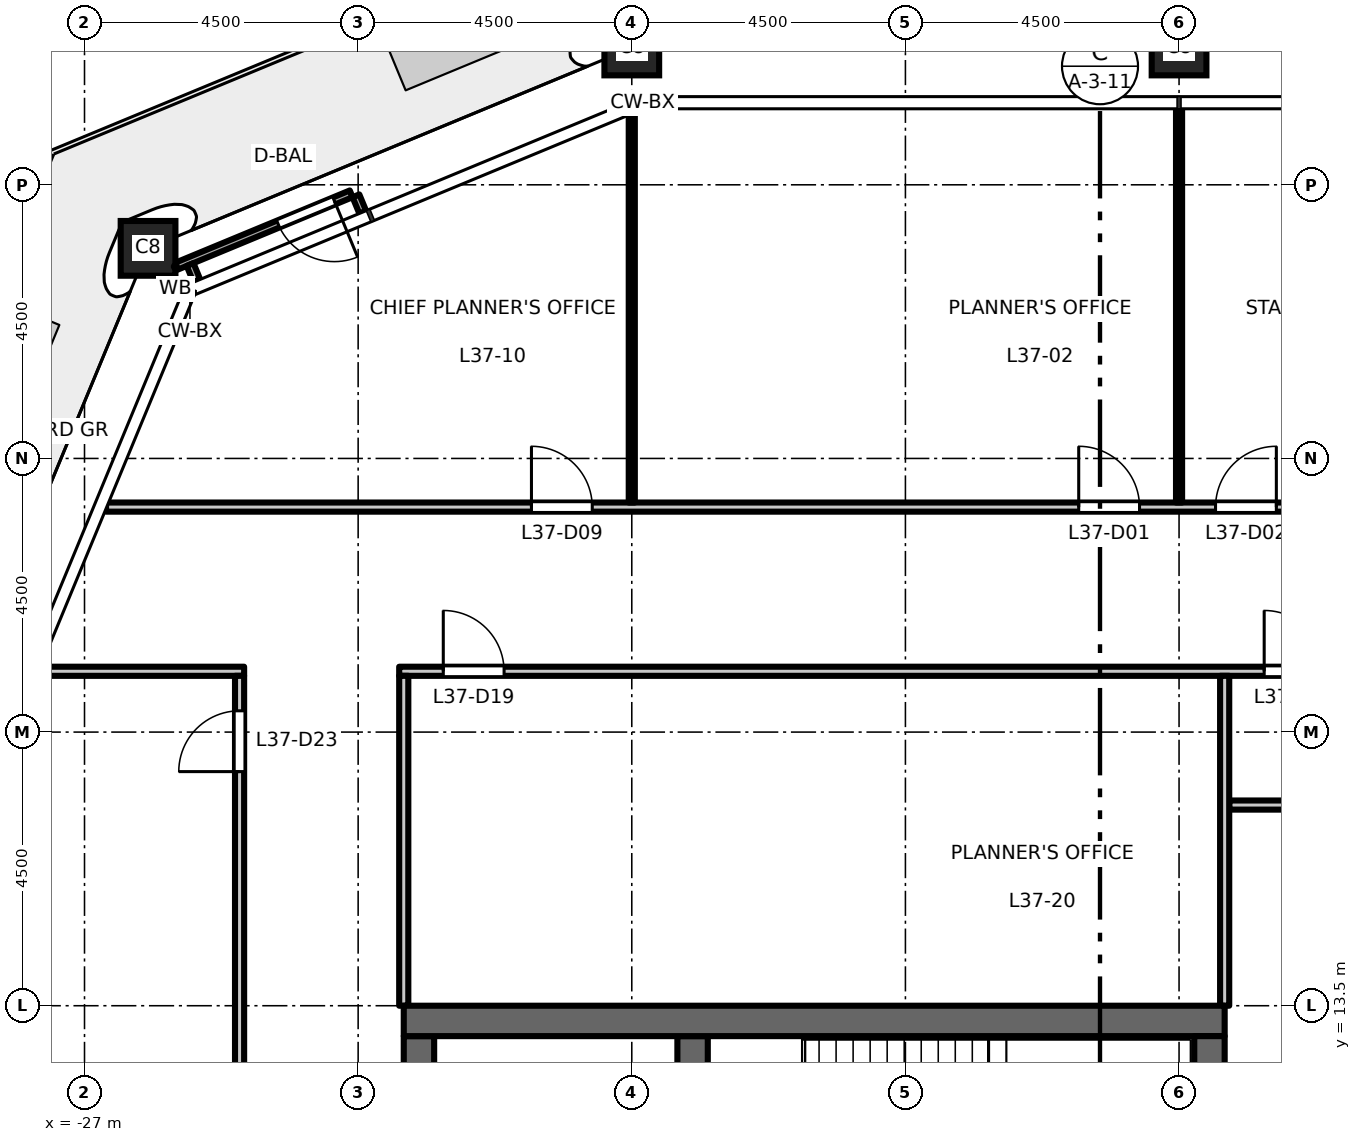
"""IFC4 building model, lengths in metres.
Left out: names, types, materials, properties, quantities, classifications, styles, units other than length and angle.
Written with IfcOpenShell. Run it as: python <this file> out.ifc"""

import sys

from ifc_helpers import new_model, si_unit, direction, frame, frame_2d, origin, origin_2d, place, context, subcontext, project, spatial, rectangle, hollow_rectangle, extrude, element, fill, save


model = new_model("IFC4")
c1 = context("Model", 3, precision=1e-05, world=origin(), true_north=direction((0.0, 1.0)))
c2 = subcontext(c1, "Body", "Model", "MODEL_VIEW")
j1 = project(units=[si_unit("LENGTHUNIT", "METRE"), si_unit("PLANEANGLEUNIT", "RADIAN")], contexts=[c1])
p1 = place(None, origin())
s1 = spatial("IfcSite", under=j1, at=p1, CompositionType="ELEMENT")
p2 = place(p1, origin())
s2 = spatial("IfcBuilding", under=s1, at=p2, CompositionType="ELEMENT")
p3 = place(p2, frame((0.0, 0.0, 172.2)))
s3 = spatial("IfcBuildingStorey", under=s2, at=p3, CompositionType="ELEMENT", Elevation=172.2)
for number, where, z_axis, x_axis in (
    (1, (-9.0, 29.25, 0.0), (0.0, 0.0, 1.0), (1.0, 0.0, 0.0)),
    (2, (-18.0, 29.25, 0.0), (0.0, 0.0, 1.0), (1.0, 0.0, 0.0)),
    (3, (-25.955, 25.955, 0.0), (0.0, 0.0, 1.0), (1.0, 0.0, 0.0)),
):
    element("IfcColumn", number, at=place(p3, frame(where, z_axis=z_axis, x_axis=x_axis)), inside=s3, PredefinedType="COLUMN", context=c2, shape_type="SweptSolid", body=[
        extrude(hollow_rectangle(XDim=0.9, YDim=0.9, WallThickness=0.05, at=origin_2d()), origin(), (0.0, 0.0, 1.0), 4.5),
    ])
p4 = place(p3, frame((-21.5, -13.0, 0.0), z_axis=(0.0, 0.0, 1.0), x_axis=(0.0, 1.0, 0.0)))
e4 = element("IfcWall", 4, at=p4, inside=s3, PredefinedType="SHEAR", context=c2, shape_type="SweptSolid", body=[
    extrude(rectangle(XDim=26.0, YDim=0.5, at=frame_2d((13.0, 0.0))), origin(), (0.0, 0.0, 1.0), 4.35),
])
p5 = place(p4, frame((16.825, 0.0, 0.0)))
e5 = element("IfcOpeningElement", 5, at=p5, cuts=e4, PredefinedType="OPENING", context=c2, shape_type="SweptSolid", body=[
    extrude(rectangle(XDim=1.8, YDim=2.1, at=frame_2d((0.9, 1.05))), frame((0.0, 0.26, 0.0), z_axis=(0.0, -1.0, 0.0), x_axis=(1.0, 0.0, 0.0)), (0.0, 0.0, 1.0), 0.52),
])
p6 = place(p4, frame((7.375, 0.0, 0.0)))
e6 = element("IfcOpeningElement", 6, at=p6, cuts=e4, PredefinedType="OPENING", context=c2, shape_type="SweptSolid", body=[
    extrude(rectangle(XDim=1.8, YDim=2.1, at=frame_2d((0.9, 1.05))), frame((0.0, 0.26, 0.0), z_axis=(0.0, -1.0, 0.0), x_axis=(1.0, 0.0, 0.0)), (0.0, 0.0, 1.0), 0.52),
])
p7 = place(p4, frame((2.65, 0.0, 0.0)))
e7 = element("IfcOpeningElement", 7, at=p7, cuts=e4, PredefinedType="OPENING", context=c2, shape_type="SweptSolid", body=[
    extrude(rectangle(XDim=0.9, YDim=2.1, at=frame_2d((0.45, 1.05))), frame((0.0, 0.26, 0.0), z_axis=(0.0, -1.0, 0.0), x_axis=(1.0, 0.0, 0.0)), (0.0, 0.0, 1.0), 0.52),
])
p8 = place(p3, frame((-17.0, 6.425, 0.0), z_axis=(0.0, 0.0, 1.0), x_axis=(0.0, 1.0, 0.0)))
e8 = element("IfcWall", 8, at=p8, inside=s3, PredefinedType="SHEAR", context=c2, shape_type="SweptSolid", body=[
    extrude(rectangle(XDim=6.575, YDim=0.5, at=frame_2d((3.288, 0.0))), origin(), (0.0, 0.0, 1.0), 4.35),
])
p9 = place(p3, frame((-8.25, 13.25, 0.0), z_axis=(0.0, 0.0, 1.0), x_axis=(-1.0, 0.0, 0.0)))
e9 = element("IfcWall", 9, at=p9, inside=s3, PredefinedType="SHEAR", context=c2, shape_type="SweptSolid", body=[
    extrude(rectangle(XDim=13.5, YDim=0.5, at=frame_2d((6.75, 0.0))), origin(), (0.0, 0.0, 1.0), 4.35),
])
p10 = place(p3, frame((-8.5, -13.0, 0.0), z_axis=(0.0, 0.0, 1.0), x_axis=(0.0, 1.0, 0.0)))
e10 = element("IfcWall", 10, at=p10, inside=s3, PredefinedType="SHEAR", context=c2, shape_type="SweptSolid", body=[
    extrude(rectangle(XDim=26.0, YDim=0.5, at=frame_2d((13.0, 0.0))), origin(), (0.0, 0.0, 1.0), 4.35),
])
for number, where, z_axis, x_axis in (
    (11, (-22.425, 26.551, 0.0), (0.0, 0.0, 1.0), (-0.382, 0.924, 0.0)),
    (12, (-25.153, 25.421, 0.0), (0.0, 0.0, 1.0), (-0.383, 0.924, 0.0)),
):
    element("IfcWall", number, at=place(p3, frame(where, z_axis=z_axis, x_axis=x_axis)), inside=s3, PredefinedType="STANDARD", context=c2, shape_type="SweptSolid", body=[
        extrude(rectangle(XDim=0.29, YDim=0.12, at=frame_2d((0.145, 0.0))), origin(), (0.0, 0.0, 1.0), 4.35),
    ])
p11 = place(p3, frame((-22.615, 26.852, 0.0), z_axis=(0.0, 0.0, 1.0), x_axis=(-0.923876066186, -0.382691800707, 0.0)))
e13 = element("IfcWall", 13, at=p11, inside=s3, PredefinedType="STANDARD", context=c2, shape_type="SweptSolid", body=[
    extrude(rectangle(XDim=3.128, YDim=0.12, at=frame_2d((1.564, 0.0))), origin(), (0.0, 0.0, 1.0), 4.35),
])
p12 = place(p11, frame((0.3, 0.0, 0.0)))
e14 = element("IfcOpeningElement", 14, at=p12, cuts=e13, PredefinedType="OPENING", context=c2, shape_type="SweptSolid", body=[
    extrude(rectangle(XDim=1.0, YDim=2.4, at=frame_2d((0.5, 1.2))), frame((0.0, 0.07, 0.0), z_axis=(0.0, -1.0, 0.0), x_axis=(1.0, 0.0, 0.0)), (0.0, 0.0, 1.0), 0.14),
])
p13 = place(p3, frame((-8.175, 16.8, 0.0), z_axis=(0.0, 0.0, 1.0), x_axis=(1.0, 0.0, 0.0)))
e15 = element("IfcWall", 15, at=p13, inside=s3, PredefinedType="PARTITIONING", context=c2, shape_type="SweptSolid", body=[
    extrude(rectangle(XDim=15.095, YDim=0.15, at=frame_2d((7.547, 0.0))), origin(), (0.0, 0.0, 1.0), 4.35),
])
p14 = place(p13, frame((4.575, 0.0, 0.0)))
e16 = element("IfcOpeningElement", 16, at=p14, cuts=e15, PredefinedType="OPENING", context=c2, shape_type="SweptSolid", body=[
    extrude(rectangle(XDim=1.0, YDim=2.1, at=frame_2d((0.5, 1.05))), frame((0.0, 0.085, 0.0), z_axis=(0.0, -1.0, 0.0), x_axis=(1.0, 0.0, 0.0)), (0.0, 0.0, 1.0), 0.17),
])
p15 = place(p13, frame((6.825, 0.0, 0.0)))
e17 = element("IfcOpeningElement", 17, at=p15, cuts=e15, PredefinedType="OPENING", context=c2, shape_type="SweptSolid", body=[
    extrude(rectangle(XDim=1.0, YDim=2.1, at=frame_2d((0.5, 1.05))), frame((0.0, 0.085, 0.0), z_axis=(0.0, -1.0, 0.0), x_axis=(1.0, 0.0, 0.0)), (0.0, 0.0, 1.0), 0.17),
])
p16 = place(p13, frame((13.575, 0.0, 0.0)))
e18 = element("IfcOpeningElement", 18, at=p16, cuts=e15, PredefinedType="OPENING", context=c2, shape_type="SweptSolid", body=[
    extrude(rectangle(XDim=1.0, YDim=2.1, at=frame_2d((0.5, 1.05))), frame((0.0, 0.085, 0.0), z_axis=(0.0, -1.0, 0.0), x_axis=(1.0, 0.0, 0.0)), (0.0, 0.0, 1.0), 0.17),
])
p17 = place(p3, frame((-27.764, 19.0, 0.0), z_axis=(0.0, 0.0, 1.0), x_axis=(1.0, 0.0, 0.0)))
e19 = element("IfcWall", 19, at=p17, inside=s3, PredefinedType="PARTITIONING", context=c2, shape_type="SweptSolid", body=[
    extrude(rectangle(XDim=3.389, YDim=0.15, at=frame_2d((1.694, 0.0))), origin(), (0.0, 0.0, 1.0), 4.35),
])
p18 = place(p3, frame((-21.825, 19.0, 0.0), z_axis=(0.0, 0.0, 1.0), x_axis=(1.0, 0.0, 0.0)))
e20 = element("IfcWall", 20, at=p18, inside=s3, PredefinedType="PARTITIONING", context=c2, shape_type="SweptSolid", body=[
    extrude(rectangle(XDim=43.65, YDim=0.15, at=frame_2d((21.825, 0.0))), origin(), (0.0, 0.0, 1.0), 4.35),
])
p19 = place(p18, frame((14.225, 0.0, 0.0)))
e21 = element("IfcOpeningElement", 21, at=p19, cuts=e20, PredefinedType="OPENING", context=c2, shape_type="SweptSolid", body=[
    extrude(rectangle(XDim=1.0, YDim=2.1, at=frame_2d((0.5, 1.05))), frame((0.0, 0.085, 0.0), z_axis=(0.0, -1.0, 0.0), x_axis=(1.0, 0.0, 0.0)), (0.0, 0.0, 1.0), 0.17),
])
p20 = place(p18, frame((0.725, 0.0, 0.0)))
e22 = element("IfcOpeningElement", 22, at=p20, cuts=e20, PredefinedType="OPENING", context=c2, shape_type="SweptSolid", body=[
    extrude(rectangle(XDim=1.0, YDim=2.1, at=frame_2d((0.5, 1.05))), frame((0.0, 0.085, 0.0), z_axis=(0.0, -1.0, 0.0), x_axis=(1.0, 0.0, 0.0)), (0.0, 0.0, 1.0), 0.17),
])
p21 = place(p18, frame((41.975, 0.0, 0.0)))
e23 = element("IfcOpeningElement", 23, at=p21, cuts=e20, PredefinedType="OPENING", context=c2, shape_type="SweptSolid", body=[
    extrude(rectangle(XDim=1.0, YDim=2.1, at=frame_2d((0.5, 1.05))), frame((0.0, 0.085, 0.0), z_axis=(0.0, -1.0, 0.0), x_axis=(1.0, 0.0, 0.0)), (0.0, 0.0, 1.0), 0.17),
])
p22 = place(p3, frame((-26.646, 21.7, 0.0), z_axis=(0.0, 0.0, 1.0), x_axis=(1.0, 0.0, 0.0)))
e24 = element("IfcWall", 24, at=p22, inside=s3, PredefinedType="PARTITIONING", context=c2, shape_type="SweptSolid", body=[
    extrude(rectangle(XDim=53.292, YDim=0.15, at=frame_2d((26.646, 0.0))), origin(), (0.0, 0.0, 1.0), 4.35),
])
p23 = place(p22, frame((15.996, 0.0, 0.0)))
e25 = element("IfcOpeningElement", 25, at=p23, cuts=e24, PredefinedType="OPENING", context=c2, shape_type="SweptSolid", body=[
    extrude(rectangle(XDim=1.0, YDim=2.1, at=frame_2d((0.5, 1.05))), frame((0.0, 0.085, 0.0), z_axis=(0.0, -1.0, 0.0), x_axis=(1.0, 0.0, 0.0)), (0.0, 0.0, 1.0), 0.17),
])
p24 = place(p22, frame((18.246, 0.0, 0.0)))
e26 = element("IfcOpeningElement", 26, at=p24, cuts=e24, PredefinedType="OPENING", context=c2, shape_type="SweptSolid", body=[
    extrude(rectangle(XDim=1.0, YDim=2.1, at=frame_2d((0.5, 1.05))), frame((0.0, 0.085, 0.0), z_axis=(0.0, -1.0, 0.0), x_axis=(1.0, 0.0, 0.0)), (0.0, 0.0, 1.0), 0.17),
])
p25 = place(p22, frame((33.996, 0.0, 0.0)))
e27 = element("IfcOpeningElement", 27, at=p25, cuts=e24, PredefinedType="OPENING", context=c2, shape_type="SweptSolid", body=[
    extrude(rectangle(XDim=1.0, YDim=2.1, at=frame_2d((0.5, 1.05))), frame((0.0, 0.085, 0.0), z_axis=(0.0, -1.0, 0.0), x_axis=(1.0, 0.0, 0.0)), (0.0, 0.0, 1.0), 0.17),
])
p26 = place(p22, frame((36.246, 0.0, 0.0)))
e28 = element("IfcOpeningElement", 28, at=p26, cuts=e24, PredefinedType="OPENING", context=c2, shape_type="SweptSolid", body=[
    extrude(rectangle(XDim=1.0, YDim=2.1, at=frame_2d((0.5, 1.05))), frame((0.0, 0.085, 0.0), z_axis=(0.0, -1.0, 0.0), x_axis=(1.0, 0.0, 0.0)), (0.0, 0.0, 1.0), 0.17),
])
p27 = place(p22, frame((6.996, 0.0, 0.0)))
e29 = element("IfcOpeningElement", 29, at=p27, cuts=e24, PredefinedType="OPENING", context=c2, shape_type="SweptSolid", body=[
    extrude(rectangle(XDim=1.0, YDim=2.1, at=frame_2d((0.5, 1.05))), frame((0.0, 0.085, 0.0), z_axis=(0.0, -1.0, 0.0), x_axis=(1.0, 0.0, 0.0)), (0.0, 0.0, 1.0), 0.17),
])
p28 = place(p22, frame((45.142, 0.0, 0.0)))
e30 = element("IfcOpeningElement", 30, at=p28, cuts=e24, PredefinedType="OPENING", context=c2, shape_type="SweptSolid", body=[
    extrude(rectangle(XDim=1.0, YDim=2.1, at=frame_2d((0.5, 1.05))), frame((0.0, 0.085, 0.0), z_axis=(0.0, -1.0, 0.0), x_axis=(1.0, 0.0, 0.0)), (0.0, 0.0, 1.0), 0.17),
])
p29 = place(p3, frame((-24.45, -18.925, 0.0), z_axis=(0.0, 0.0, 1.0), x_axis=(0.0, 1.0, 0.0)))
e31 = element("IfcWall", 31, at=p29, inside=s3, PredefinedType="PARTITIONING", context=c2, shape_type="SweptSolid", body=[
    extrude(rectangle(XDim=37.85, YDim=0.15, at=frame_2d((18.925, 0.0))), origin(), (0.0, 0.0, 1.0), 4.35),
])
p30 = place(p29, frame((36.275, 0.0, 0.0)))
e32 = element("IfcOpeningElement", 32, at=p30, cuts=e31, PredefinedType="OPENING", context=c2, shape_type="SweptSolid", body=[
    extrude(rectangle(XDim=1.0, YDim=2.1, at=frame_2d((0.5, 1.05))), frame((0.0, 0.085, 0.0), z_axis=(0.0, -1.0, 0.0), x_axis=(1.0, 0.0, 0.0)), (0.0, 0.0, 1.0), 0.17),
])
p31 = place(p3, frame((-21.75, 13.5, 0.0), z_axis=(0.0, 0.0, 1.0), x_axis=(0.0, 1.0, 0.0)))
e33 = element("IfcWall", 33, at=p31, inside=s3, PredefinedType="PARTITIONING", context=c2, shape_type="SweptSolid", body=[
    extrude(rectangle(XDim=5.425, YDim=0.15, at=frame_2d((2.712, 0.0))), origin(), (0.0, 0.0, 1.0), 4.35),
])
p32 = place(p3, frame((-18.0, 21.775, 0.0), z_axis=(0.0, 0.0, 1.0), x_axis=(0.0, 1.0, 0.0)))
e34 = element("IfcWall", 34, at=p32, inside=s3, PredefinedType="PARTITIONING", context=c2, shape_type="SweptSolid", body=[
    extrude(rectangle(XDim=6.403, YDim=0.1, at=frame_2d((3.202, 0.0))), origin(), (0.0, 0.0, 1.0), 3.45),
])
p33 = place(p3, frame((-9.0, 21.775, 0.0), z_axis=(0.0, 0.0, 1.0), x_axis=(0.0, 1.0, 0.0)))
e35 = element("IfcWall", 35, at=p33, inside=s3, PredefinedType="PARTITIONING", context=c2, shape_type="SweptSolid", body=[
    extrude(rectangle(XDim=6.485, YDim=0.1, at=frame_2d((3.243, 0.0))), origin(), (0.0, 0.0, 1.0), 3.45),
])
p34 = place(p3, frame((-8.25, 13.5, 0.0), z_axis=(0.0, 0.0, 1.0), x_axis=(0.0, 1.0, 0.0)))
e36 = element("IfcWall", 36, at=p34, inside=s3, PredefinedType="PARTITIONING", context=c2, shape_type="SweptSolid", body=[
    extrude(rectangle(XDim=5.425, YDim=0.15, at=frame_2d((2.712, 0.0))), origin(), (0.0, 0.0, 1.0), 4.35),
])
p35 = place(p12, origin())
e37 = element("IfcDoor", 37, at=p35, inside=s3, OperationType="SINGLE_SWING_LEFT", PredefinedType="DOOR", context=c2, shape_type="SweptSolid", body=[
    extrude(rectangle(XDim=1.0, YDim=2.4, at=frame_2d((0.5, 1.2))), frame((0.0, 0.025, 0.0), z_axis=(0.0, -1.0, 0.0), x_axis=(1.0, 0.0, 0.0)), (0.0, 0.0, 1.0), 0.05),
])
fill(e14, e37)
p36 = place(p23, origin())
e38 = element("IfcDoor", 38, at=p36, inside=s3, OperationType="SINGLE_SWING_LEFT", PredefinedType="DOOR", context=c2, shape_type="SweptSolid", body=[
    extrude(rectangle(XDim=1.0, YDim=2.1, at=frame_2d((0.5, 1.05))), frame((0.0, 0.025, 0.0), z_axis=(0.0, -1.0, 0.0), x_axis=(1.0, 0.0, 0.0)), (0.0, 0.0, 1.0), 0.05),
])
fill(e25, e38)
p37 = place(p24, origin())
e39 = element("IfcDoor", 39, at=p37, inside=s3, OperationType="SINGLE_SWING_RIGHT", PredefinedType="DOOR", context=c2, shape_type="SweptSolid", body=[
    extrude(rectangle(XDim=1.0, YDim=2.1, at=frame_2d((0.5, 1.05))), frame((0.0, 0.025, 0.0), z_axis=(0.0, -1.0, 0.0), x_axis=(1.0, 0.0, 0.0)), (0.0, 0.0, 1.0), 0.05),
])
fill(e26, e39)
p38 = place(p27, origin())
e40 = element("IfcDoor", 40, at=p38, inside=s3, OperationType="SINGLE_SWING_LEFT", PredefinedType="DOOR", context=c2, shape_type="SweptSolid", body=[
    extrude(rectangle(XDim=1.0, YDim=2.1, at=frame_2d((0.5, 1.05))), frame((0.0, 0.025, 0.0), z_axis=(0.0, -1.0, 0.0), x_axis=(1.0, 0.0, 0.0)), (0.0, 0.0, 1.0), 0.05),
])
fill(e29, e40)
p39 = place(p19, origin())
e41 = element("IfcDoor", 41, at=p39, inside=s3, OperationType="SINGLE_SWING_LEFT", PredefinedType="DOOR", context=c2, shape_type="SweptSolid", body=[
    extrude(rectangle(XDim=1.0, YDim=2.1, at=frame_2d((0.5, 1.05))), frame((0.0, 0.025, 0.0), z_axis=(0.0, -1.0, 0.0), x_axis=(1.0, 0.0, 0.0)), (0.0, 0.0, 1.0), 0.05),
])
fill(e21, e41)
p40 = place(p20, origin())
e42 = element("IfcDoor", 42, at=p40, inside=s3, OperationType="SINGLE_SWING_LEFT", PredefinedType="DOOR", context=c2, shape_type="SweptSolid", body=[
    extrude(rectangle(XDim=1.0, YDim=2.1, at=frame_2d((0.5, 1.05))), frame((0.0, 0.025, 0.0), z_axis=(0.0, -1.0, 0.0), x_axis=(1.0, 0.0, 0.0)), (0.0, 0.0, 1.0), 0.05),
])
fill(e22, e42)
p41 = place(p30, origin())
e43 = element("IfcDoor", 43, at=p41, inside=s3, OperationType="SINGLE_SWING_LEFT", PredefinedType="DOOR", context=c2, shape_type="SweptSolid", body=[
    extrude(rectangle(XDim=1.0, YDim=2.1, at=frame_2d((0.5, 1.05))), frame((0.0, 0.025, 0.0), z_axis=(0.0, -1.0, 0.0), x_axis=(1.0, 0.0, 0.0)), (0.0, 0.0, 1.0), 0.05),
])
fill(e32, e43)
save(model, sys.argv[1])
